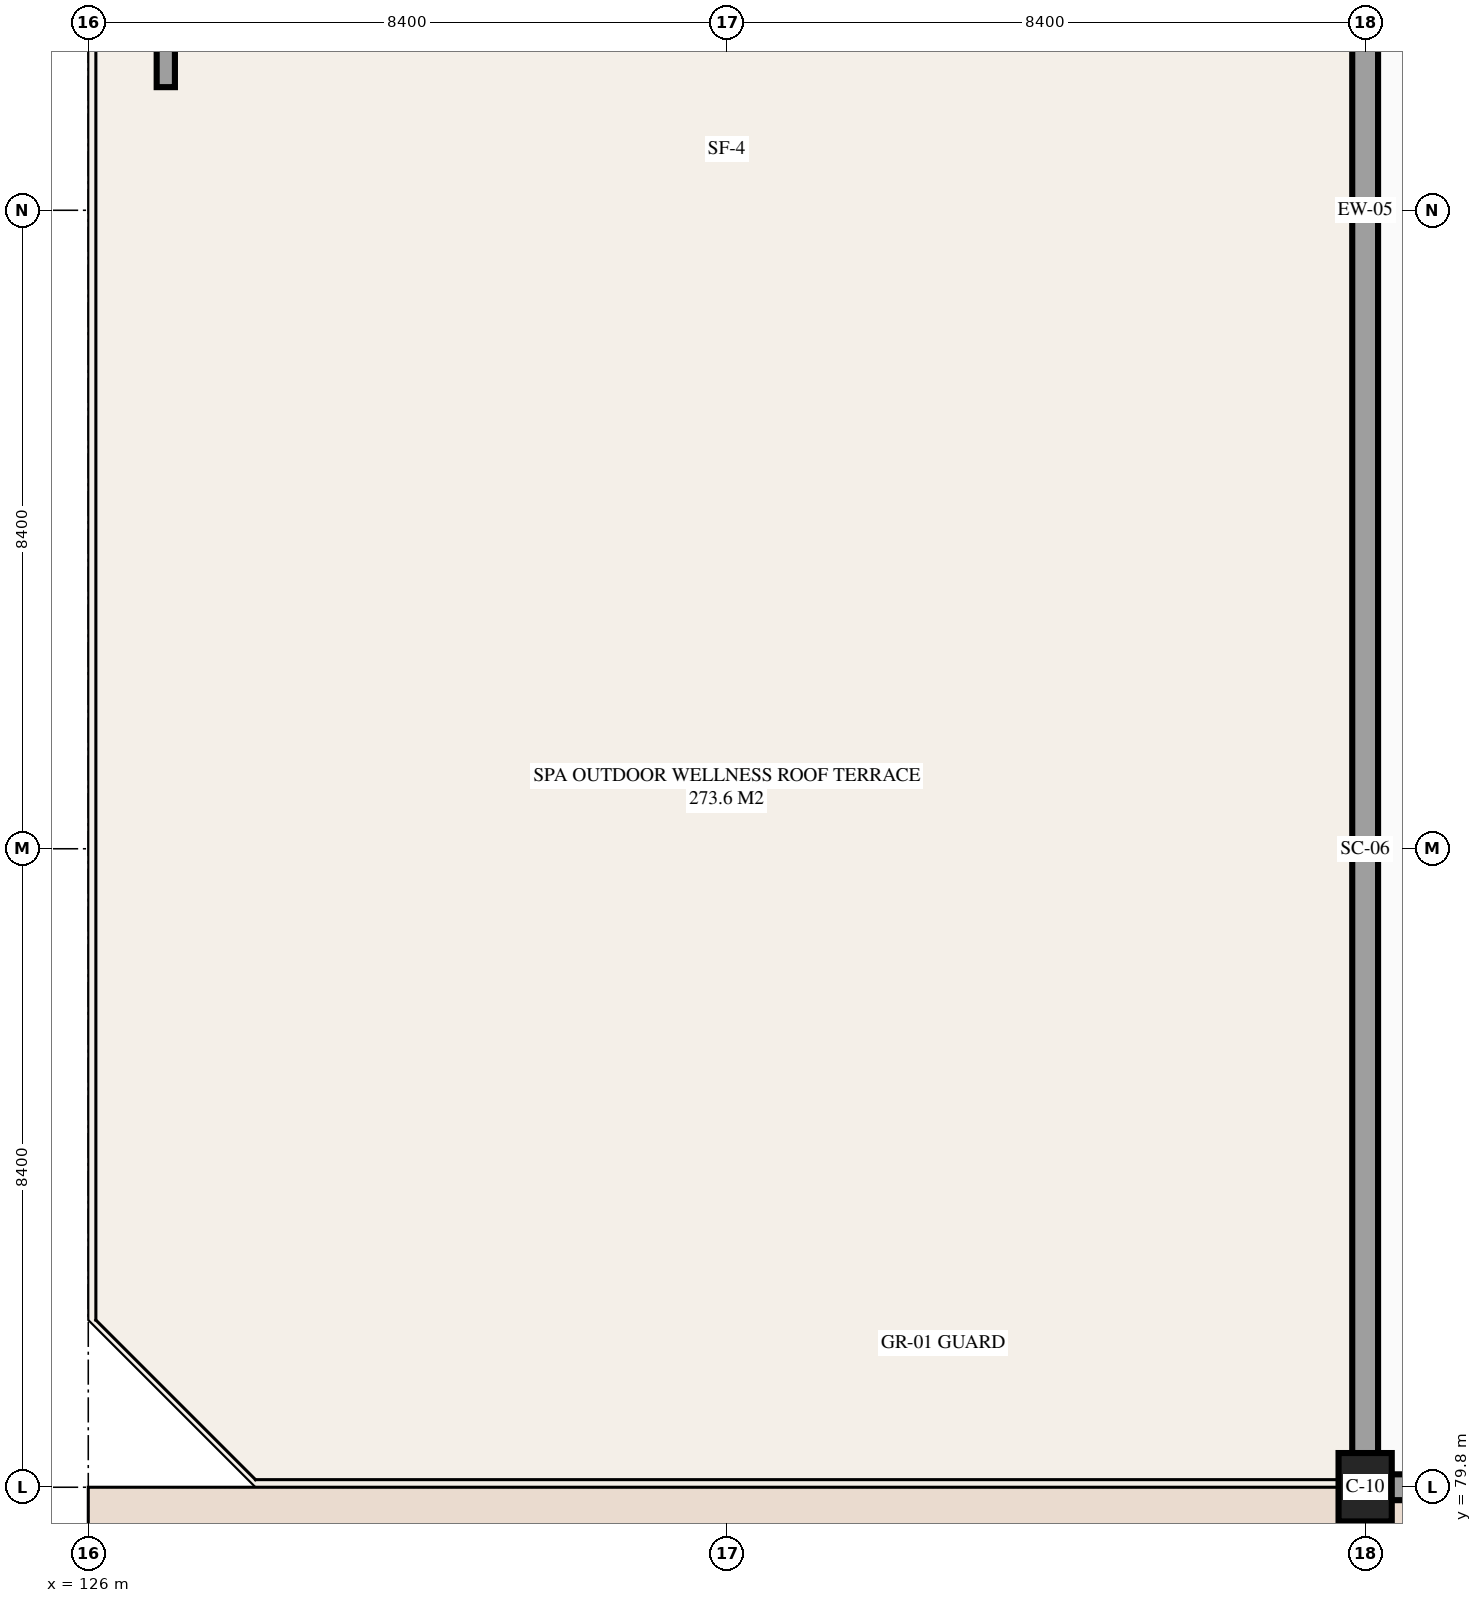
"""IFC4 building model, lengths in metres.
Left out: names, types, materials, properties, quantities, classifications, styles, units other than length and angle.
Written with IfcOpenShell. Run it as: python <this file> out.ifc"""

import sys

from ifc_helpers import new_model, si_unit, direction, frame, frame_2d, origin, origin_2d, place, context, subcontext, project, spatial, rectangle, hollow_rectangle, extrude, element, save


model = new_model("IFC4")
c1 = context("Model", 3, precision=1e-05, world=origin(), true_north=direction((0.0, 1.0)))
c2 = subcontext(c1, "Body", "Model", "MODEL_VIEW")
j1 = project(units=[si_unit("LENGTHUNIT", "METRE"), si_unit("PLANEANGLEUNIT", "RADIAN")], contexts=[c1])
p1 = place(None, origin())
s1 = spatial("IfcSite", under=j1, at=p1, CompositionType="ELEMENT")
p2 = place(p1, origin())
s2 = spatial("IfcBuilding", under=s1, at=p2, CompositionType="ELEMENT")
p3 = place(p2, frame((0.0, 0.0, 14.1)))
s3 = spatial("IfcBuildingStorey", under=s2, at=p3, CompositionType="ELEMENT", Elevation=14.1)
p4 = place(p3, frame((142.8, 79.8, 0.0), z_axis=(0.0, 0.0, 1.0), x_axis=(1.0, 0.0, 0.0)))
e1 = element("IfcColumn", 1, at=p4, inside=s3, PredefinedType="COLUMN", context=c2, shape_type="SweptSolid", body=[
    extrude(rectangle(XDim=0.7, YDim=0.9, at=origin_2d()), origin(), (0.0, 0.0, 1.0), 4.2),
])
for number, where, z_axis, x_axis in (
    (2, (142.8, 88.2, 0.0), (0.0, 0.0, 1.0), (1.0, 0.0, 0.0)),
    (3, (142.8, 96.6, 0.0), (0.0, 0.0, 1.0), (1.0, 0.0, 0.0)),
):
    element("IfcColumn", number, at=place(p3, frame(where, z_axis=z_axis, x_axis=x_axis)), inside=s3, PredefinedType="COLUMN", context=c2, shape_type="SweptSolid", body=[
        extrude(hollow_rectangle(XDim=0.254, YDim=0.254, WallThickness=0.012, InnerFilletRadius=0.012, OuterFilletRadius=0.024, at=origin_2d()), origin(), (0.0, 0.0, 1.0), 4.2),
    ])
p5 = place(p3, frame((142.8, 105.0, 0.0), z_axis=(0.0, 0.0, 1.0), x_axis=(0.0, -1.0, 0.0)))
e4 = element("IfcWall", 4, at=p5, inside=s3, PredefinedType="STANDARD", context=c2, shape_type="SweptSolid", body=[
    extrude(rectangle(XDim=16.8, YDim=0.34, at=frame_2d((8.4, 0.0))), origin(), (0.0, 0.0, 1.0), 3.2),
])
p6 = place(p5, frame((5.9, 0.0, 0.0), z_axis=(0.0, 0.0, 1.0), x_axis=(-1.0, 0.0, 0.0)))
e5 = element("IfcOpeningElement", 5, at=p6, cuts=e4, PredefinedType="OPENING", context=c2, shape_type="SweptSolid", body=[
    extrude(rectangle(XDim=1.8, YDim=2.3, at=frame_2d((0.9, 1.15))), frame((0.0, 0.18, 0.0), z_axis=(0.0, -1.0, 0.0), x_axis=(1.0, 0.0, 0.0)), (0.0, 0.0, 1.0), 0.36),
])
p7 = place(p3, frame((142.8, 79.8, 0.0), z_axis=(0.0, 0.0, 1.0), x_axis=(1.0, 0.0, 0.0)))
e6 = element("IfcWall", 6, at=p7, inside=s3, PredefinedType="STANDARD", context=c2, shape_type="SweptSolid", body=[
    extrude(rectangle(XDim=16.8, YDim=0.34, at=frame_2d((8.4, 0.0))), origin(), (0.0, 0.0, 1.0), 3.15),
])
p8 = place(p3, frame((127.02, 98.22, 0.0), z_axis=(0.0, 0.0, 1.0), x_axis=(0.0, 1.0, 0.0)))
e7 = element("IfcWall", 7, at=p8, inside=s3, PredefinedType="PARTITIONING", context=c2, shape_type="SweptSolid", body=[
    extrude(rectangle(XDim=4.16, YDim=0.24, at=frame_2d((2.08, 0.0))), origin(), (0.0, 0.0, 1.0), 3.895),
])
p9 = place(p3, frame((142.8, 88.2, 0.0), z_axis=(0.0, 0.0, 1.0), x_axis=(0.0, -1.0, 0.0)))
e8 = element("IfcWall", 8, at=p9, inside=s3, PredefinedType="STANDARD", context=c2, shape_type="SweptSolid", body=[
    extrude(rectangle(XDim=8.4, YDim=0.34, at=frame_2d((4.2, 0.0))), origin(), (0.0, 0.0, 1.0), 3.15),
])
save(model, sys.argv[1])
